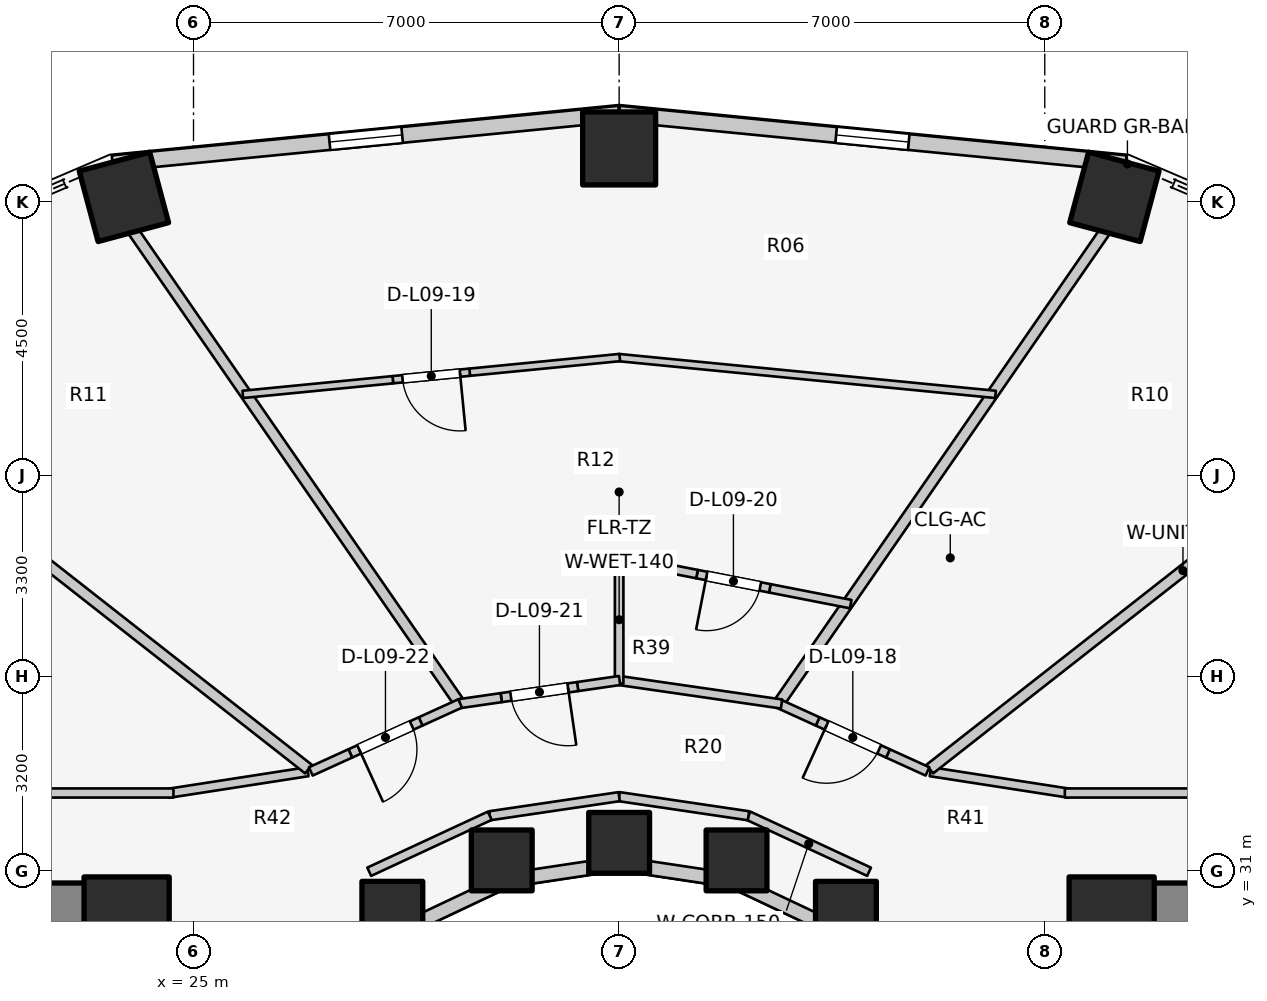
"""IFC4 building model, lengths in metres.
Left out: names, types, materials, properties, quantities, classifications, styles, units other than length and angle.
Written with IfcOpenShell. Run it as: python <this file> out.ifc"""

import sys

from ifc_helpers import new_model, si_unit, direction, frame, frame_2d, origin, origin_2d, place, context, subcontext, project, spatial, rectangle, extrude, element, fill, save


model = new_model("IFC4")
c1 = context("Model", 3, precision=1e-05, world=origin(), true_north=direction((0.0, 1.0)))
c2 = subcontext(c1, "Body", "Model", "MODEL_VIEW")
j1 = project(units=[si_unit("LENGTHUNIT", "METRE"), si_unit("PLANEANGLEUNIT", "RADIAN")], contexts=[c1])
p1 = place(None, origin())
s1 = spatial("IfcSite", under=j1, at=p1, CompositionType="ELEMENT")
p2 = place(p1, origin())
s2 = spatial("IfcBuilding", under=s1, at=p2, CompositionType="ELEMENT")
p3 = place(p2, frame((0.0, 0.0, 33.8)))
s3 = spatial("IfcBuildingStorey", under=s2, at=p3, CompositionType="ELEMENT", Elevation=33.8)
for number, where, z_axis, x_axis in (
    (1, (19.65, 30.35, 0.0), (0.0, 0.0, 1.0), (1.0, 0.0, 0.0)),
    (2, (39.85, 30.35, 0.0), (0.0, 0.0, 1.0), (1.0, 0.0, 0.0)),
):
    element("IfcWall", number, at=place(p3, frame(where, z_axis=z_axis, x_axis=x_axis)), inside=s3, PredefinedType="SHEAR", context=c2, shape_type="SweptSolid", body=[
        extrude(rectangle(XDim=4.5, YDim=0.9, at=frame_2d((2.25, 0.0))), origin(), (0.0, 0.0, 1.0), 3.1),
    ])
for number, where, z_axis, x_axis in (
    (3, (23.9, 30.2, 0.0), (0.0, 0.0, 1.0), (1.0, 0.0, 0.0)),
    (4, (40.1, 30.2, 0.0), (0.0, 0.0, 1.0), (1.0, 0.0, 0.0)),
):
    element("IfcColumn", number, at=place(p3, frame(where, z_axis=z_axis, x_axis=x_axis)), inside=s3, PredefinedType="COLUMN", context=c2, shape_type="SweptSolid", body=[
        extrude(rectangle(XDim=1.4, YDim=1.4, at=origin_2d()), origin(), (0.0, 0.0, 1.0), 3.1),
    ])
for number, where, z_axis, x_axis in (
    (5, (35.73, 30.327, 0.0), (0.0, 0.0, 1.0), (1.0, 0.0, 0.0)),
    (6, (33.931, 31.172, 0.0), (0.0, 0.0, 1.0), (1.0, 0.0, 0.0)),
):
    element("IfcColumn", number, at=place(p3, frame(where, z_axis=z_axis, x_axis=x_axis)), inside=s3, PredefinedType="COLUMN", context=c2, shape_type="SweptSolid", body=[
        extrude(rectangle(XDim=1.0, YDim=1.0, at=origin_2d()), origin(), (0.0, 0.0, 1.0), 3.1),
    ])
p4 = place(p3, frame((40.145, 42.084, 0.0), z_axis=(0.0, 0.0, 1.0), x_axis=(0.258819045103, 0.965925826289, 0.0)))
e7 = element("IfcColumn", 7, at=p4, inside=s3, PredefinedType="COLUMN", context=c2, shape_type="SweptSolid", body=[
    extrude(rectangle(XDim=1.2, YDim=1.2, at=origin_2d()), origin(), (0.0, 0.0, 1.0), 3.1),
])
p5 = place(p3, frame((32.0, 31.46, 0.0), z_axis=(0.0, 0.0, 1.0), x_axis=(1.0, 0.0, 0.0)))
e8 = element("IfcColumn", 8, at=p5, inside=s3, PredefinedType="COLUMN", context=c2, shape_type="SweptSolid", body=[
    extrude(rectangle(XDim=1.0, YDim=1.0, at=origin_2d()), origin(), (0.0, 0.0, 1.0), 3.1),
])
p6 = place(p3, frame((32.0, 42.88, 0.0), z_axis=(0.0, 0.0, 1.0), x_axis=(0.0, 1.0, 0.0)))
e9 = element("IfcColumn", 9, at=p6, inside=s3, PredefinedType="COLUMN", context=c2, shape_type="SweptSolid", body=[
    extrude(rectangle(XDim=1.2, YDim=1.2, at=origin_2d()), origin(), (0.0, 0.0, 1.0), 3.1),
])
p7 = place(p3, frame((30.069, 31.172, 0.0), z_axis=(0.0, 0.0, 1.0), x_axis=(1.0, 0.0, 0.0)))
e10 = element("IfcColumn", 10, at=p7, inside=s3, PredefinedType="COLUMN", context=c2, shape_type="SweptSolid", body=[
    extrude(rectangle(XDim=1.0, YDim=1.0, at=origin_2d()), origin(), (0.0, 0.0, 1.0), 3.1),
])
p8 = place(p3, frame((23.855, 42.084, 0.0), z_axis=(0.0, 0.0, 1.0), x_axis=(-0.258819045103, 0.965925826289, 0.0)))
e11 = element("IfcColumn", 11, at=p8, inside=s3, PredefinedType="COLUMN", context=c2, shape_type="SweptSolid", body=[
    extrude(rectangle(XDim=1.2, YDim=1.2, at=origin_2d()), origin(), (0.0, 0.0, 1.0), 3.1),
])
p9 = place(p3, frame((28.27, 30.327, 0.0), z_axis=(0.0, 0.0, 1.0), x_axis=(1.0, 0.0, 0.0)))
e12 = element("IfcColumn", 12, at=p9, inside=s3, PredefinedType="COLUMN", context=c2, shape_type="SweptSolid", body=[
    extrude(rectangle(XDim=1.0, YDim=1.0, at=origin_2d()), origin(), (0.0, 0.0, 1.0), 3.1),
])
p10 = place(p3, frame((35.56, 30.032, 0.0), z_axis=(0.0, 0.0, 1.0), x_axis=(-0.904179699603, 0.427152280606, 0.0)))
e13 = element("IfcWall", 13, at=p10, inside=s3, PredefinedType="STANDARD", context=c2, shape_type="SweptSolid", body=[
    extrude(rectangle(XDim=1.899, YDim=0.23, at=frame_2d((0.95, 0.0))), origin(), (0.0, 0.0, 1.0), 1.22),
])
for number, where, z_axis, x_axis in (
    (14, (33.843, 30.843, 0.0), (0.0, 0.0, 1.0), (-0.989, 0.149, 0.0)),
    (15, (32.0, 31.12, 0.0), (0.0, 0.0, 1.0), (-0.989, -0.149, 0.0)),
):
    element("IfcWall", number, at=place(p3, frame(where, z_axis=z_axis, x_axis=x_axis)), inside=s3, PredefinedType="STANDARD", context=c2, shape_type="SweptSolid", body=[
        extrude(rectangle(XDim=1.864, YDim=0.23, at=frame_2d((0.932, 0.0))), origin(), (0.0, 0.0, 1.0), 1.22),
    ])
p11 = place(p3, frame((30.157, 30.843, 0.0), z_axis=(0.0, 0.0, 1.0), x_axis=(-0.904179699603, -0.427152280606, 0.0)))
e16 = element("IfcWall", 16, at=p11, inside=s3, PredefinedType="STANDARD", context=c2, shape_type="SweptSolid", body=[
    extrude(rectangle(XDim=1.899, YDim=0.23, at=frame_2d((0.95, 0.0))), origin(), (0.0, 0.0, 1.0), 1.22),
])
p12 = place(p3, frame((40.332, 42.636, 0.0), z_axis=(0.0, 0.0, 1.0), x_axis=(-0.995247718352, 0.097375454379, 0.0)))
e17 = element("IfcWall", 17, at=p12, inside=s3, PredefinedType="STANDARD", context=c2, shape_type="SweptSolid", body=[
    extrude(rectangle(XDim=8.372, YDim=0.26, at=frame_2d((4.186, 0.0))), origin(), (0.0, 0.0, 1.0), 1.22),
])
p13 = place(p12, frame((3.586, 0.0, 0.15)))
e18 = element("IfcOpeningElement", 18, at=p13, cuts=e17, PredefinedType="OPENING", context=c2, shape_type="SweptSolid", body=[
    extrude(rectangle(XDim=1.2, YDim=0.9, at=frame_2d((0.6, 0.45))), frame((0.0, 0.14, 0.0), z_axis=(0.0, -1.0, 0.0), x_axis=(1.0, 0.0, 0.0)), (0.0, 0.0, 1.0), 0.28),
])
p14 = place(p3, frame((32.0, 43.451, 0.0), z_axis=(0.0, 0.0, 1.0), x_axis=(-0.995247718352, -0.097375454379, 0.0)))
e19 = element("IfcWall", 19, at=p14, inside=s3, PredefinedType="STANDARD", context=c2, shape_type="SweptSolid", body=[
    extrude(rectangle(XDim=8.372, YDim=0.26, at=frame_2d((4.186, 0.0))), origin(), (0.0, 0.0, 1.0), 1.22),
])
p15 = place(p14, frame((3.586, 0.0, 0.15)))
e20 = element("IfcOpeningElement", 20, at=p15, cuts=e19, PredefinedType="OPENING", context=c2, shape_type="SweptSolid", body=[
    extrude(rectangle(XDim=1.2, YDim=0.9, at=frame_2d((0.6, 0.45))), frame((0.0, 0.14, 0.0), z_axis=(0.0, -1.0, 0.0), x_axis=(1.0, 0.0, 0.0)), (0.0, 0.0, 1.0), 0.28),
])
p16 = place(p3, frame((36.11, 30.985, 0.0), z_axis=(0.0, 0.0, 1.0), x_axis=(-0.906943449489, 0.421252393975, 0.0)))
e21 = element("IfcWall", 21, at=p16, inside=s3, PredefinedType="PARTITIONING", context=c2, shape_type="SweptSolid", body=[
    extrude(rectangle(XDim=2.186, YDim=0.15, at=frame_2d((1.093, 0.0))), origin(), (0.0, 0.0, 1.0), 1.957),
])
for number, where, z_axis, x_axis in (
    (22, (34.127, 31.906, 0.0), (0.0, 0.0, 1.0), (-0.989, 0.146, 0.0)),
    (23, (32.0, 32.22, 0.0), (0.0, 0.0, 1.0), (-0.989, -0.146, 0.0)),
):
    element("IfcWall", number, at=place(p3, frame(where, z_axis=z_axis, x_axis=x_axis)), inside=s3, PredefinedType="PARTITIONING", context=c2, shape_type="SweptSolid", body=[
        extrude(rectangle(XDim=2.151, YDim=0.15, at=frame_2d((1.075, 0.0))), origin(), (0.0, 0.0, 1.0), 1.957),
    ])
p17 = place(p3, frame((29.873, 31.906, 0.0), z_axis=(0.0, 0.0, 1.0), x_axis=(-0.906943449489, -0.421252393975, 0.0)))
e24 = element("IfcWall", 24, at=p17, inside=s3, PredefinedType="PARTITIONING", context=c2, shape_type="SweptSolid", body=[
    extrude(rectangle(XDim=2.186, YDim=0.15, at=frame_2d((1.093, 0.0))), origin(), (0.0, 0.0, 1.0), 1.957),
])
p18 = place(p3, frame((37.119, 32.631, 0.0), z_axis=(0.0, 0.0, 1.0), x_axis=(0.988184633586, -0.153268163508, 0.0)))
e25 = element("IfcWall", 25, at=p18, inside=s3, PredefinedType="PARTITIONING", context=c2, shape_type="SweptSolid", body=[
    extrude(rectangle(XDim=2.318, YDim=0.15, at=frame_2d((1.159, 0.0))), origin(), (0.0, 0.0, 1.0), 1.957),
])
p19 = place(p3, frame((39.33, 32.28, 0.0), z_axis=(0.0, 0.0, 1.0), x_axis=(1.0, 0.0, 0.0)))
e26 = element("IfcWall", 26, at=p19, inside=s3, PredefinedType="PARTITIONING", context=c2, shape_type="SweptSolid", body=[
    extrude(rectangle(XDim=5.06, YDim=0.15, at=frame_2d((2.53, 0.0))), origin(), (0.0, 0.0, 1.0), 1.957),
])
p20 = place(p3, frame((26.881, 32.631, 0.0), z_axis=(0.0, 0.0, 1.0), x_axis=(-0.988184633586, -0.153268163508, 0.0)))
e27 = element("IfcWall", 27, at=p20, inside=s3, PredefinedType="PARTITIONING", context=c2, shape_type="SweptSolid", body=[
    extrude(rectangle(XDim=2.318, YDim=0.15, at=frame_2d((1.159, 0.0))), origin(), (0.0, 0.0, 1.0), 1.957),
])
p21 = place(p3, frame((19.51, 32.28, 0.0), z_axis=(0.0, 0.0, 1.0), x_axis=(1.0, 0.0, 0.0)))
e28 = element("IfcWall", 28, at=p21, inside=s3, PredefinedType="PARTITIONING", context=c2, shape_type="SweptSolid", body=[
    extrude(rectangle(XDim=5.16, YDim=0.15, at=frame_2d((2.58, 0.0))), origin(), (0.0, 0.0, 1.0), 1.957),
])
p22 = place(p3, frame((37.108, 32.673, 0.0), z_axis=(0.0, 0.0, 1.0), x_axis=(0.78700868866, 0.616941912966, 0.0)))
e29 = element("IfcWall", 29, at=p22, inside=s3, PredefinedType="PARTITIONING", context=c2, shape_type="SweptSolid", body=[
    extrude(rectangle(XDim=10.583, YDim=0.18, at=frame_2d((5.292, 0.0))), origin(), (0.0, 0.0, 1.0), 1.957),
])
for number, where, z_axis, x_axis in (
    (30, (34.653, 33.796, 0.0), (0.0, 0.0, 1.0), (0.569, 0.823, 0.0)),
    (31, (29.347, 33.796, 0.0), (0.0, 0.0, 1.0), (-0.569, 0.823, 0.0)),
):
    element("IfcWall", number, at=place(p3, frame(where, z_axis=z_axis, x_axis=x_axis)), inside=s3, PredefinedType="PARTITIONING", context=c2, shape_type="SweptSolid", body=[
        extrude(rectangle(XDim=9.394, YDim=0.18, at=frame_2d((4.697, 0.0))), origin(), (0.0, 0.0, 1.0), 1.957),
    ])
p23 = place(p3, frame((26.892, 32.673, 0.0), z_axis=(0.0, 0.0, 1.0), x_axis=(-0.78700868866, 0.616941912966, 0.0)))
e32 = element("IfcWall", 32, at=p23, inside=s3, PredefinedType="PARTITIONING", context=c2, shape_type="SweptSolid", body=[
    extrude(rectangle(XDim=10.583, YDim=0.18, at=frame_2d((5.292, 0.0))), origin(), (0.0, 0.0, 1.0), 1.957),
])
p24 = place(p3, frame((37.071, 32.635, 0.0), z_axis=(0.0, 0.0, 1.0), x_axis=(-0.910167389119, 0.414240659261, 0.0)))
e33 = element("IfcWall", 33, at=p24, inside=s3, PredefinedType="PARTITIONING", context=c2, shape_type="SweptSolid", body=[
    extrude(rectangle(XDim=0.714, YDim=0.15, at=frame_2d((0.357, 0.0))), origin(), (0.0, 0.0, 1.0), 2.575),
])
p25 = place(p3, frame((36.421, 32.931, 0.0), z_axis=(0.0, 0.0, 1.0), x_axis=(-0.910168885926, 0.414237370469, 0.0)))
e34 = element("IfcWall", 34, at=p25, inside=s3, PredefinedType="PARTITIONING", context=c2, shape_type="SweptSolid", body=[
    extrude(rectangle(XDim=1.27, YDim=0.15, at=frame_2d((0.635, 0.0))), origin(), (0.0, 0.0, 1.0), 2.16),
])
p26 = place(p25, frame((0.16, 0.0, 0.0)))
e35 = element("IfcOpeningElement", 35, at=p26, cuts=e34, PredefinedType="OPENING", context=c2, shape_type="SweptSolid", body=[
    extrude(rectangle(XDim=0.95, YDim=2.1, at=frame_2d((0.475, 1.05))), frame((0.0, 0.085, 0.0), z_axis=(0.0, -1.0, 0.0), x_axis=(1.0, 0.0, 0.0)), (0.0, 0.0, 1.0), 0.17),
])
p27 = place(p3, frame((35.265, 33.457, 0.0), z_axis=(0.0, 0.0, 1.0), x_axis=(-0.910237621284, 0.414086310809, 0.0)))
e36 = element("IfcWall", 36, at=p27, inside=s3, PredefinedType="PARTITIONING", context=c2, shape_type="SweptSolid", body=[
    extrude(rectangle(XDim=0.714, YDim=0.15, at=frame_2d((0.357, 0.0))), origin(), (0.0, 0.0, 1.0), 1.957),
])
p28 = place(p3, frame((38.19, 38.835, 0.0), z_axis=(0.0, 0.0, 1.0), x_axis=(-0.995257435484, 0.097276087063, 0.0)))
e37 = element("IfcWall", 37, at=p28, inside=s3, PredefinedType="MOVABLE", context=c2, shape_type="SweptSolid", body=[
    extrude(rectangle(XDim=6.229, YDim=0.12, at=frame_2d((3.115, 0.0))), origin(), (0.0, 0.0, 1.0), 1.957),
])
p29 = place(p3, frame((32.01, 39.441, 0.0), z_axis=(0.0, 0.0, 1.0), x_axis=(-0.995256979001, -0.097280757346, 0.0)))
e38 = element("IfcWall", 38, at=p29, inside=s3, PredefinedType="MOVABLE", context=c2, shape_type="SweptSolid", body=[
    extrude(rectangle(XDim=2.479, YDim=0.12, at=frame_2d((1.24, 0.0))), origin(), (0.0, 0.0, 1.0), 1.957),
])
p30 = place(p3, frame((29.542, 39.2, 0.0), z_axis=(0.0, 0.0, 1.0), x_axis=(-0.995257398837, -0.097276462007, 0.0)))
e39 = element("IfcWall", 39, at=p30, inside=s3, PredefinedType="MOVABLE", context=c2, shape_type="SweptSolid", body=[
    extrude(rectangle(XDim=1.27, YDim=0.12, at=frame_2d((0.635, 0.0))), origin(), (0.0, 0.0, 1.0), 2.575),
])
p31 = place(p30, frame((0.16, 0.0, 0.0)))
e40 = element("IfcOpeningElement", 40, at=p31, cuts=e39, PredefinedType="OPENING", context=c2, shape_type="SweptSolid", body=[
    extrude(rectangle(XDim=0.95, YDim=2.1, at=frame_2d((0.475, 1.05))), frame((0.0, 0.07, 0.0), z_axis=(0.0, -1.0, 0.0), x_axis=(1.0, 0.0, 0.0)), (0.0, 0.0, 1.0), 0.14),
])
p32 = place(p3, frame((28.278, 39.076, 0.0), z_axis=(0.0, 0.0, 1.0), x_axis=(-0.995257910667, -0.097271225219, 0.0)))
e41 = element("IfcWall", 41, at=p32, inside=s3, PredefinedType="MOVABLE", context=c2, shape_type="SweptSolid", body=[
    extrude(rectangle(XDim=2.48, YDim=0.12, at=frame_2d((1.24, 0.0))), origin(), (0.0, 0.0, 1.0), 1.957),
])
p33 = place(p3, frame((34.671, 33.744, 0.0), z_axis=(0.0, 0.0, 1.0), x_axis=(-0.989701115085, 0.143149232617, 0.0)))
e42 = element("IfcWall", 42, at=p33, inside=s3, PredefinedType="PARTITIONING", context=c2, shape_type="SweptSolid", body=[
    extrude(rectangle(XDim=2.749, YDim=0.15, at=frame_2d((1.375, 0.0))), origin(), (0.0, 0.0, 1.0), 1.957),
])
p34 = place(p3, frame((32.0, 34.08, 0.0), z_axis=(0.0, 0.0, 1.0), x_axis=(0.0, 1.0, 0.0)))
e43 = element("IfcWall", 43, at=p34, inside=s3, PredefinedType="PLUMBINGWALL", context=c2, shape_type="SweptSolid", body=[
    extrude(rectangle(XDim=2.1, YDim=0.14, at=frame_2d((1.05, 0.0))), origin(), (0.0, 0.0, 1.0), 1.957),
])
p35 = place(p3, frame((35.808, 35.386, 0.0), z_axis=(0.0, 0.0, 1.0), x_axis=(-0.981484809036, 0.191539994861, 0.0)))
e44 = element("IfcWall", 44, at=p35, inside=s3, PredefinedType="PLUMBINGWALL", context=c2, shape_type="SweptSolid", body=[
    extrude(rectangle(XDim=1.355, YDim=0.14, at=frame_2d((0.677, 0.0))), origin(), (0.0, 0.0, 1.0), 2.575),
])
p36 = place(p3, frame((34.478, 35.646, 0.0), z_axis=(0.0, 0.0, 1.0), x_axis=(-0.981455717174, 0.191689006535, 0.0)))
e45 = element("IfcWall", 45, at=p36, inside=s3, PredefinedType="PLUMBINGWALL", context=c2, shape_type="SweptSolid", body=[
    extrude(rectangle(XDim=1.22, YDim=0.14, at=frame_2d((0.61, 0.0))), origin(), (0.0, 0.0, 1.0), 2.575),
])
p37 = place(p36, frame((0.16, 0.0, 0.0)))
e46 = element("IfcOpeningElement", 46, at=p37, cuts=e45, PredefinedType="OPENING", context=c2, shape_type="SweptSolid", body=[
    extrude(rectangle(XDim=0.9, YDim=2.1, at=frame_2d((0.45, 1.05))), frame((0.0, 0.08, 0.0), z_axis=(0.0, -1.0, 0.0), x_axis=(1.0, 0.0, 0.0)), (0.0, 0.0, 1.0), 0.16),
])
p38 = place(p3, frame((33.281, 35.88, 0.0), z_axis=(0.0, 0.0, 1.0), x_axis=(-0.981450920641, 0.191713563349, 0.0)))
e47 = element("IfcWall", 47, at=p38, inside=s3, PredefinedType="PLUMBINGWALL", context=c2, shape_type="SweptSolid", body=[
    extrude(rectangle(XDim=1.355, YDim=0.14, at=frame_2d((0.677, 0.0))), origin(), (0.0, 0.0, 1.0), 1.957),
])
p39 = place(p3, frame((32.007, 34.13, 0.0), z_axis=(0.0, 0.0, 1.0), x_axis=(-0.989723948494, -0.142991278678, 0.0)))
e48 = element("IfcWall", 48, at=p39, inside=s3, PredefinedType="PARTITIONING", context=c2, shape_type="SweptSolid", body=[
    extrude(rectangle(XDim=0.697, YDim=0.15, at=frame_2d((0.348, 0.0))), origin(), (0.0, 0.0, 1.0), 1.957),
])
p40 = place(p3, frame((31.318, 34.03, 0.0), z_axis=(0.0, 0.0, 1.0), x_axis=(-0.989690239562, -0.143224403355, 0.0)))
e49 = element("IfcWall", 49, at=p40, inside=s3, PredefinedType="PARTITIONING", context=c2, shape_type="SweptSolid", body=[
    extrude(rectangle(XDim=1.27, YDim=0.15, at=frame_2d((0.635, 0.0))), origin(), (0.0, 0.0, 1.0), 2.575),
])
p41 = place(p40, frame((0.16, 0.0, 0.0)))
e50 = element("IfcOpeningElement", 50, at=p41, cuts=e49, PredefinedType="OPENING", context=c2, shape_type="SweptSolid", body=[
    extrude(rectangle(XDim=0.95, YDim=2.1, at=frame_2d((0.475, 1.05))), frame((0.0, 0.085, 0.0), z_axis=(0.0, -1.0, 0.0), x_axis=(1.0, 0.0, 0.0)), (0.0, 0.0, 1.0), 0.17),
])
p42 = place(p3, frame((30.061, 33.848, 0.0), z_axis=(0.0, 0.0, 1.0), x_axis=(-0.989723948494, -0.142991278678, 0.0)))
e51 = element("IfcWall", 51, at=p42, inside=s3, PredefinedType="PARTITIONING", context=c2, shape_type="SweptSolid", body=[
    extrude(rectangle(XDim=0.697, YDim=0.15, at=frame_2d((0.348, 0.0))), origin(), (0.0, 0.0, 1.0), 2.575),
])
p43 = place(p3, frame((29.385, 33.753, 0.0), z_axis=(0.0, 0.0, 1.0), x_axis=(-0.910167389119, -0.414240659261, 0.0)))
e52 = element("IfcWall", 52, at=p43, inside=s3, PredefinedType="PARTITIONING", context=c2, shape_type="SweptSolid", body=[
    extrude(rectangle(XDim=0.714, YDim=0.15, at=frame_2d((0.357, 0.0))), origin(), (0.0, 0.0, 1.0), 1.957),
])
p44 = place(p3, frame((28.735, 33.457, 0.0), z_axis=(0.0, 0.0, 1.0), x_axis=(-0.910241350267, -0.414078113722, 0.0)))
e53 = element("IfcWall", 53, at=p44, inside=s3, PredefinedType="PARTITIONING", context=c2, shape_type="SweptSolid", body=[
    extrude(rectangle(XDim=1.27, YDim=0.15, at=frame_2d((0.635, 0.0))), origin(), (0.0, 0.0, 1.0), 2.16),
])
p45 = place(p44, frame((0.16, 0.0, 0.0)))
e54 = element("IfcOpeningElement", 54, at=p45, cuts=e53, PredefinedType="OPENING", context=c2, shape_type="SweptSolid", body=[
    extrude(rectangle(XDim=0.95, YDim=2.1, at=frame_2d((0.475, 1.05))), frame((0.0, 0.085, 0.0), z_axis=(0.0, -1.0, 0.0), x_axis=(1.0, 0.0, 0.0)), (0.0, 0.0, 1.0), 0.17),
])
p46 = place(p3, frame((27.579, 32.931, 0.0), z_axis=(0.0, 0.0, 1.0), x_axis=(-0.910108713425, -0.414369556976, 0.0)))
e55 = element("IfcWall", 55, at=p46, inside=s3, PredefinedType="PARTITIONING", context=c2, shape_type="SweptSolid", body=[
    extrude(rectangle(XDim=0.714, YDim=0.15, at=frame_2d((0.357, 0.0))), origin(), (0.0, 0.0, 1.0), 2.575),
])
p47 = place(p13, origin())
e56 = element("IfcWindow", 56, at=p47, inside=s3, PartitioningType="SINGLE_PANEL", PredefinedType="WINDOW", context=c2, shape_type="SweptSolid", body=[
    extrude(rectangle(XDim=1.2, YDim=0.9, at=frame_2d((0.6, 0.45))), frame((0.0, 0.03, 0.0), z_axis=(0.0, -1.0, 0.0), x_axis=(1.0, 0.0, 0.0)), (0.0, 0.0, 1.0), 0.06),
])
fill(e18, e56)
p48 = place(p15, origin())
e57 = element("IfcWindow", 57, at=p48, inside=s3, PartitioningType="SINGLE_PANEL", PredefinedType="WINDOW", context=c2, shape_type="SweptSolid", body=[
    extrude(rectangle(XDim=1.2, YDim=0.9, at=frame_2d((0.6, 0.45))), frame((0.0, 0.03, 0.0), z_axis=(0.0, -1.0, 0.0), x_axis=(1.0, 0.0, 0.0)), (0.0, 0.0, 1.0), 0.06),
])
fill(e20, e57)
p49 = place(p26, origin())
e58 = element("IfcDoor", 58, at=p49, inside=s3, OperationType="SINGLE_SWING_RIGHT", PredefinedType="DOOR", context=c2, shape_type="SweptSolid", body=[
    extrude(rectangle(XDim=0.95, YDim=2.1, at=frame_2d((0.475, 1.05))), frame((0.0, 0.025, 0.0), z_axis=(0.0, -1.0, 0.0), x_axis=(1.0, 0.0, 0.0)), (0.0, 0.0, 1.0), 0.05),
])
fill(e35, e58)
p50 = place(p31, origin())
e59 = element("IfcDoor", 59, at=p50, inside=s3, OperationType="SINGLE_SWING_LEFT", PredefinedType="DOOR", context=c2, shape_type="SweptSolid", body=[
    extrude(rectangle(XDim=0.95, YDim=2.1, at=frame_2d((0.475, 1.05))), frame((0.0, 0.025, 0.0), z_axis=(0.0, -1.0, 0.0), x_axis=(1.0, 0.0, 0.0)), (0.0, 0.0, 1.0), 0.05),
])
fill(e40, e59)
p51 = place(p37, origin())
e60 = element("IfcDoor", 60, at=p51, inside=s3, OperationType="SINGLE_SWING_RIGHT", PredefinedType="DOOR", context=c2, shape_type="SweptSolid", body=[
    extrude(rectangle(XDim=0.9, YDim=2.1, at=frame_2d((0.45, 1.05))), frame((0.0, 0.025, 0.0), z_axis=(0.0, -1.0, 0.0), x_axis=(1.0, 0.0, 0.0)), (0.0, 0.0, 1.0), 0.05),
])
fill(e46, e60)
p52 = place(p41, origin())
e61 = element("IfcDoor", 61, at=p52, inside=s3, OperationType="SINGLE_SWING_LEFT", PredefinedType="DOOR", context=c2, shape_type="SweptSolid", body=[
    extrude(rectangle(XDim=0.95, YDim=2.1, at=frame_2d((0.475, 1.05))), frame((0.0, 0.025, 0.0), z_axis=(0.0, -1.0, 0.0), x_axis=(1.0, 0.0, 0.0)), (0.0, 0.0, 1.0), 0.05),
])
fill(e50, e61)
p53 = place(p45, origin())
e62 = element("IfcDoor", 62, at=p53, inside=s3, OperationType="SINGLE_SWING_RIGHT", PredefinedType="DOOR", context=c2, shape_type="SweptSolid", body=[
    extrude(rectangle(XDim=0.95, YDim=2.1, at=frame_2d((0.475, 1.05))), frame((0.0, 0.025, 0.0), z_axis=(0.0, -1.0, 0.0), x_axis=(1.0, 0.0, 0.0)), (0.0, 0.0, 1.0), 0.05),
])
fill(e54, e62)
save(model, sys.argv[1])
